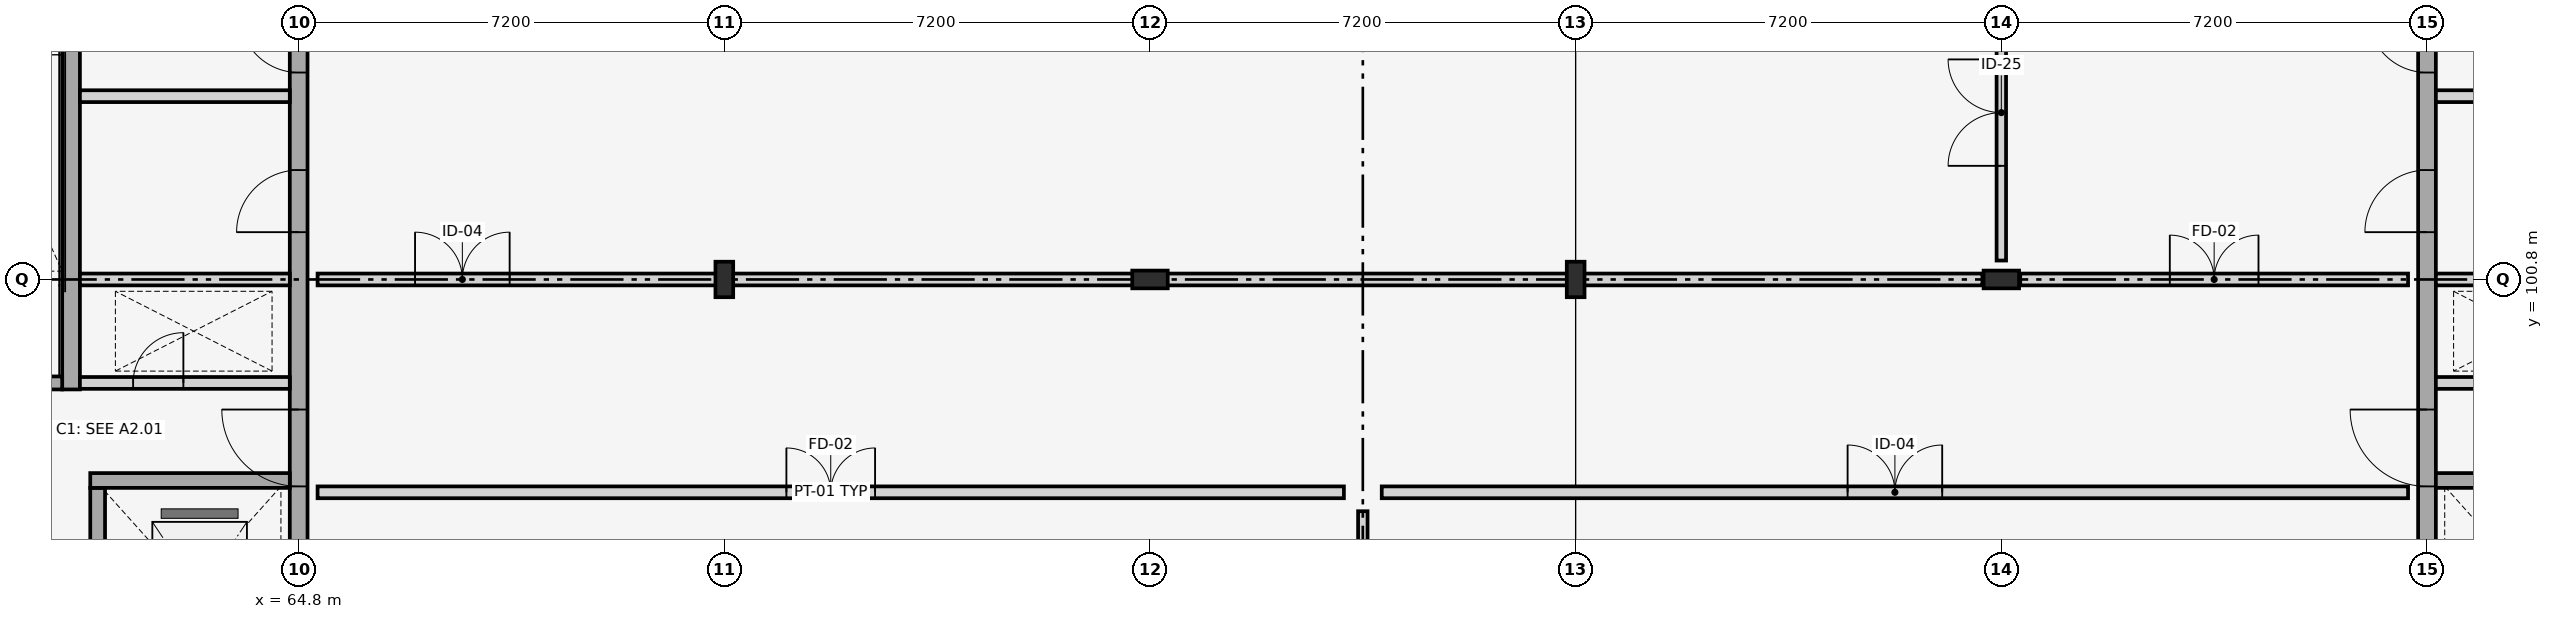
"""IFC4 building model, lengths in metres.
Left out: names, types, materials, properties, quantities, classifications, styles, units other than length and angle.
Written with IfcOpenShell. Run it as: python <this file> out.ifc"""

import sys

from ifc_helpers import new_model, si_unit, direction, frame, frame_2d, origin, origin_2d, place, context, subcontext, project, spatial, rectangle, i_section, extrude, element, fill, save


model = new_model("IFC4")
c1 = context("Model", 3, precision=1e-05, world=origin(), true_north=direction((0.0, 1.0)))
c2 = subcontext(c1, "Body", "Model", "MODEL_VIEW")
j1 = project(units=[si_unit("LENGTHUNIT", "METRE"), si_unit("PLANEANGLEUNIT", "RADIAN")], contexts=[c1])
p1 = place(None, origin())
s1 = spatial("IfcSite", under=j1, at=p1, CompositionType="ELEMENT")
p2 = place(p1, origin())
s2 = spatial("IfcBuilding", under=s1, at=p2, CompositionType="ELEMENT")
p3 = place(p2, origin())
s3 = spatial("IfcBuildingStorey", under=s2, at=p3, CompositionType="ELEMENT", Elevation=0.0)
for number, where, z_axis, x_axis in (
    (1, (72.0, 100.8, 0.0), (0.0, 0.0, 1.0), (1.0, 0.0, 0.0)),
    (2, (79.2, 100.8, 0.0), (0.0, 0.0, 1.0), (0.0, 1.0, 0.0)),
    (3, (86.4, 100.8, 0.0), (0.0, 0.0, 1.0), (1.0, 0.0, 0.0)),
    (4, (93.6, 100.8, 0.0), (0.0, 0.0, 1.0), (0.0, 1.0, 0.0)),
):
    element("IfcColumn", number, at=place(p3, frame(where, z_axis=z_axis, x_axis=x_axis)), inside=s3, PredefinedType="COLUMN", context=c2, shape_type="SweptSolid", body=[
        extrude(i_section(OverallWidth=0.3, OverallDepth=0.6, WebThickness=0.015, FlangeThickness=0.03, FilletRadius=0.027, at=origin_2d()), origin(), (0.0, 0.0, 1.0), 4.5),
    ])
p4 = place(p3, frame((64.8, 93.75, 0.0), z_axis=(0.0, 0.0, 1.0), x_axis=(0.0, 1.0, 0.0)))
e5 = element("IfcWall", 5, at=p4, inside=s3, PredefinedType="SHEAR", context=c2, shape_type="SweptSolid", body=[
    extrude(rectangle(XDim=14.1, YDim=0.3, at=frame_2d((7.05, 0.0))), origin(), (0.0, 0.0, 1.0), 4.28),
])
p5 = place(p4, frame((3.55, 0.0, 0.0)))
e6 = element("IfcOpeningElement", 6, at=p5, cuts=e5, PredefinedType="OPENING", context=c2, shape_type="SweptSolid", body=[
    extrude(rectangle(XDim=1.3, YDim=2.2, at=frame_2d((0.65, 1.1))), frame((0.0, 0.16, 0.0), z_axis=(0.0, -1.0, 0.0), x_axis=(1.0, 0.0, 0.0)), (0.0, 0.0, 1.0), 0.32),
])
p6 = place(p4, frame((7.85, 0.0, 0.0)))
e7 = element("IfcOpeningElement", 7, at=p6, cuts=e5, PredefinedType="OPENING", context=c2, shape_type="SweptSolid", body=[
    extrude(rectangle(XDim=1.05, YDim=2.15, at=frame_2d((0.525, 1.075))), frame((0.0, 0.16, 0.0), z_axis=(0.0, -1.0, 0.0), x_axis=(1.0, 0.0, 0.0)), (0.0, 0.0, 1.0), 0.32),
])
p7 = place(p4, frame((10.55, 0.0, 0.0)))
e8 = element("IfcOpeningElement", 8, at=p7, cuts=e5, PredefinedType="OPENING", context=c2, shape_type="SweptSolid", body=[
    extrude(rectangle(XDim=1.0, YDim=2.15, at=frame_2d((0.5, 1.075))), frame((0.0, 0.16, 0.0), z_axis=(0.0, -1.0, 0.0), x_axis=(1.0, 0.0, 0.0)), (0.0, 0.0, 1.0), 0.32),
])
p8 = place(p3, frame((61.4, 93.75, 0.0), z_axis=(0.0, 0.0, 1.0), x_axis=(0.0, 1.0, 0.0)))
e9 = element("IfcWall", 9, at=p8, inside=s3, PredefinedType="SHEAR", context=c2, shape_type="SweptSolid", body=[
    extrude(rectangle(XDim=3.525, YDim=0.25, at=frame_2d((1.762, 0.0))), origin(), (0.0, 0.0, 1.0), 4.28),
])
p9 = place(p8, frame((1.2, 0.0, 0.0)))
e10 = element("IfcOpeningElement", 10, at=p9, cuts=e9, PredefinedType="OPENING", context=c2, shape_type="SweptSolid", body=[
    extrude(rectangle(XDim=1.1, YDim=2.15, at=frame_2d((0.55, 1.075))), frame((0.0, 0.135, 0.0), z_axis=(0.0, -1.0, 0.0), x_axis=(1.0, 0.0, 0.0)), (0.0, 0.0, 1.0), 0.27),
])
p10 = place(p3, frame((60.95, 98.94, 0.0), z_axis=(0.0, 0.0, 1.0), x_axis=(0.0, 1.0, 0.0)))
e11 = element("IfcWall", 11, at=p10, inside=s3, PredefinedType="SHEAR", context=c2, shape_type="SweptSolid", body=[
    extrude(rectangle(XDim=8.91, YDim=0.3, at=frame_2d((4.455, 0.0))), origin(), (0.0, 0.0, 1.0), 4.28),
])
p11 = place(p3, frame((61.1, 99.05, 0.0), z_axis=(0.0, 0.0, 1.0), x_axis=(1.0, 0.0, 0.0)))
e12 = element("IfcWall", 12, at=p11, inside=s3, PredefinedType="PLUMBINGWALL", context=c2, shape_type="SweptSolid", body=[
    extrude(rectangle(XDim=3.55, YDim=0.2, at=frame_2d((1.775, 0.0))), origin(), (0.0, 0.0, 1.0), 3.7),
])
p12 = place(p11, frame((0.9, 0.0, 0.0)))
e13 = element("IfcOpeningElement", 13, at=p12, cuts=e12, PredefinedType="OPENING", context=c2, shape_type="SweptSolid", body=[
    extrude(rectangle(XDim=0.85, YDim=2.05, at=frame_2d((0.425, 1.025))), frame((0.0, 0.11, 0.0), z_axis=(0.0, -1.0, 0.0), x_axis=(1.0, 0.0, 0.0)), (0.0, 0.0, 1.0), 0.22),
])
p13 = place(p3, frame((57.9, 99.05, 0.0), z_axis=(0.0, 0.0, 1.0), x_axis=(1.0, 0.0, 0.0)))
e14 = element("IfcWall", 14, at=p13, inside=s3, PredefinedType="SHEAR", context=c2, shape_type="SweptSolid", body=[
    extrude(rectangle(XDim=2.9, YDim=0.22, at=frame_2d((1.45, 0.0))), origin(), (0.0, 0.0, 1.0), 4.28),
])
p14 = place(p13, frame((0.75, 0.0, 0.0)))
e15 = element("IfcOpeningElement", 15, at=p14, cuts=e14, PredefinedType="OPENING", context=c2, shape_type="SweptSolid", body=[
    extrude(rectangle(XDim=1.3, YDim=2.2, at=frame_2d((0.65, 1.1))), frame((0.0, 0.12, 0.0), z_axis=(0.0, -1.0, 0.0), x_axis=(1.0, 0.0, 0.0)), (0.0, 0.0, 1.0), 0.24),
])
p15 = place(p3, frame((61.275, 97.4, 0.0), z_axis=(0.0, 0.0, 1.0), x_axis=(1.0, 0.0, 0.0)))
e16 = element("IfcWall", 16, at=p15, inside=s3, PredefinedType="SHEAR", context=c2, shape_type="SweptSolid", body=[
    extrude(rectangle(XDim=3.375, YDim=0.25, at=frame_2d((1.688, 0.0))), origin(), (0.0, 0.0, 1.0), 4.28),
])
for number, where, z_axis, x_axis in (
    (17, (61.1, 100.8, 0.0), (0.0, 0.0, 1.0), (1.0, 0.0, 0.0)),
    (18, (61.1, 103.9, 0.0), (0.0, 0.0, 1.0), (1.0, 0.0, 0.0)),
):
    element("IfcWall", number, at=place(p3, frame(where, z_axis=z_axis, x_axis=x_axis)), inside=s3, PredefinedType="PLUMBINGWALL", context=c2, shape_type="SweptSolid", body=[
        extrude(rectangle(XDim=3.55, YDim=0.2, at=frame_2d((1.775, 0.0))), origin(), (0.0, 0.0, 1.0), 3.7),
    ])
p16 = place(p3, frame((100.8, 93.75, 0.0), z_axis=(0.0, 0.0, 1.0), x_axis=(0.0, 1.0, 0.0)))
e19 = element("IfcWall", 19, at=p16, inside=s3, PredefinedType="SHEAR", context=c2, shape_type="SweptSolid", body=[
    extrude(rectangle(XDim=14.1, YDim=0.3, at=frame_2d((7.05, 0.0))), origin(), (0.0, 0.0, 1.0), 4.28),
])
p17 = place(p16, frame((3.55, 0.0, 0.0)))
e20 = element("IfcOpeningElement", 20, at=p17, cuts=e19, PredefinedType="OPENING", context=c2, shape_type="SweptSolid", body=[
    extrude(rectangle(XDim=1.3, YDim=2.2, at=frame_2d((0.65, 1.1))), frame((0.0, 0.16, 0.0), z_axis=(0.0, -1.0, 0.0), x_axis=(1.0, 0.0, 0.0)), (0.0, 0.0, 1.0), 0.32),
])
p18 = place(p16, frame((7.85, 0.0, 0.0)))
e21 = element("IfcOpeningElement", 21, at=p18, cuts=e19, PredefinedType="OPENING", context=c2, shape_type="SweptSolid", body=[
    extrude(rectangle(XDim=1.05, YDim=2.15, at=frame_2d((0.525, 1.075))), frame((0.0, 0.16, 0.0), z_axis=(0.0, -1.0, 0.0), x_axis=(1.0, 0.0, 0.0)), (0.0, 0.0, 1.0), 0.32),
])
p19 = place(p16, frame((10.55, 0.0, 0.0)))
e22 = element("IfcOpeningElement", 22, at=p19, cuts=e19, PredefinedType="OPENING", context=c2, shape_type="SweptSolid", body=[
    extrude(rectangle(XDim=1.0, YDim=2.15, at=frame_2d((0.5, 1.075))), frame((0.0, 0.16, 0.0), z_axis=(0.0, -1.0, 0.0), x_axis=(1.0, 0.0, 0.0)), (0.0, 0.0, 1.0), 0.32),
])
p20 = place(p3, frame((100.95, 99.05, 0.0), z_axis=(0.0, 0.0, 1.0), x_axis=(1.0, 0.0, 0.0)))
e23 = element("IfcWall", 23, at=p20, inside=s3, PredefinedType="PLUMBINGWALL", context=c2, shape_type="SweptSolid", body=[
    extrude(rectangle(XDim=3.55, YDim=0.2, at=frame_2d((1.775, 0.0))), origin(), (0.0, 0.0, 1.0), 3.7),
])
p21 = place(p20, frame((0.9, 0.0, 0.0)))
e24 = element("IfcOpeningElement", 24, at=p21, cuts=e23, PredefinedType="OPENING", context=c2, shape_type="SweptSolid", body=[
    extrude(rectangle(XDim=0.85, YDim=2.05, at=frame_2d((0.425, 1.025))), frame((0.0, 0.11, 0.0), z_axis=(0.0, -1.0, 0.0), x_axis=(1.0, 0.0, 0.0)), (0.0, 0.0, 1.0), 0.22),
])
p22 = place(p3, frame((100.95, 97.4, 0.0), z_axis=(0.0, 0.0, 1.0), x_axis=(1.0, 0.0, 0.0)))
e25 = element("IfcWall", 25, at=p22, inside=s3, PredefinedType="SHEAR", context=c2, shape_type="SweptSolid", body=[
    extrude(rectangle(XDim=3.375, YDim=0.25, at=frame_2d((1.688, 0.0))), origin(), (0.0, 0.0, 1.0), 4.28),
])
for number, where, z_axis, x_axis in (
    (26, (100.95, 100.8, 0.0), (0.0, 0.0, 1.0), (1.0, 0.0, 0.0)),
    (27, (100.95, 103.9, 0.0), (0.0, 0.0, 1.0), (1.0, 0.0, 0.0)),
):
    element("IfcWall", number, at=place(p3, frame(where, z_axis=z_axis, x_axis=x_axis)), inside=s3, PredefinedType="PLUMBINGWALL", context=c2, shape_type="SweptSolid", body=[
        extrude(rectangle(XDim=3.55, YDim=0.2, at=frame_2d((1.775, 0.0))), origin(), (0.0, 0.0, 1.0), 3.7),
    ])
p23 = place(p3, frame((65.12, 97.2, 0.0), z_axis=(0.0, 0.0, 1.0), x_axis=(1.0, 0.0, 0.0)))
e28 = element("IfcWall", 28, at=p23, inside=s3, PredefinedType="PARTITIONING", context=c2, shape_type="SweptSolid", body=[
    extrude(rectangle(XDim=17.36, YDim=0.2, at=frame_2d((8.68, 0.0))), origin(), (0.0, 0.0, 1.0), 3.45),
])
p24 = place(p23, frame((7.93, 0.0, 0.0)))
e29 = element("IfcOpeningElement", 29, at=p24, cuts=e28, PredefinedType="OPENING", context=c2, shape_type="SweptSolid", body=[
    extrude(rectangle(XDim=1.5, YDim=2.25, at=frame_2d((0.75, 1.125))), frame((0.0, 0.11, 0.0), z_axis=(0.0, -1.0, 0.0), x_axis=(1.0, 0.0, 0.0)), (0.0, 0.0, 1.0), 0.22),
])
p25 = place(p3, frame((83.12, 97.2, 0.0), z_axis=(0.0, 0.0, 1.0), x_axis=(1.0, 0.0, 0.0)))
e30 = element("IfcWall", 30, at=p25, inside=s3, PredefinedType="PARTITIONING", context=c2, shape_type="SweptSolid", body=[
    extrude(rectangle(XDim=17.36, YDim=0.2, at=frame_2d((8.68, 0.0))), origin(), (0.0, 0.0, 1.0), 3.45),
])
p26 = place(p25, frame((7.88, 0.0, 0.0)))
e31 = element("IfcOpeningElement", 31, at=p26, cuts=e30, PredefinedType="OPENING", context=c2, shape_type="SweptSolid", body=[
    extrude(rectangle(XDim=1.6, YDim=2.35, at=frame_2d((0.8, 1.175))), frame((0.0, 0.11, 0.0), z_axis=(0.0, -1.0, 0.0), x_axis=(1.0, 0.0, 0.0)), (0.0, 0.0, 1.0), 0.22),
])
p27 = place(p3, frame((65.12, 100.8, 0.0), z_axis=(0.0, 0.0, 1.0), x_axis=(1.0, 0.0, 0.0)))
e32 = element("IfcWall", 32, at=p27, inside=s3, PredefinedType="PARTITIONING", context=c2, shape_type="SweptSolid", body=[
    extrude(rectangle(XDim=28.16, YDim=0.2, at=frame_2d((14.08, 0.0))), origin(), (0.0, 0.0, 1.0), 3.45),
])
p28 = place(p27, frame((1.649, 0.0, 0.0)))
e33 = element("IfcOpeningElement", 33, at=p28, cuts=e32, PredefinedType="OPENING", context=c2, shape_type="SweptSolid", body=[
    extrude(rectangle(XDim=1.6, YDim=2.35, at=frame_2d((0.8, 1.175))), frame((0.0, 0.11, 0.0), z_axis=(0.0, -1.0, 0.0), x_axis=(1.0, 0.0, 0.0)), (0.0, 0.0, 1.0), 0.22),
])
p29 = place(p3, frame((93.92, 100.8, 0.0), z_axis=(0.0, 0.0, 1.0), x_axis=(1.0, 0.0, 0.0)))
e34 = element("IfcWall", 34, at=p29, inside=s3, PredefinedType="PARTITIONING", context=c2, shape_type="SweptSolid", body=[
    extrude(rectangle(XDim=6.56, YDim=0.2, at=frame_2d((3.28, 0.0))), origin(), (0.0, 0.0, 1.0), 3.45),
])
p30 = place(p29, frame((2.53, 0.0, 0.0)))
e35 = element("IfcOpeningElement", 35, at=p30, cuts=e34, PredefinedType="OPENING", context=c2, shape_type="SweptSolid", body=[
    extrude(rectangle(XDim=1.5, YDim=2.25, at=frame_2d((0.75, 1.125))), frame((0.0, 0.11, 0.0), z_axis=(0.0, -1.0, 0.0), x_axis=(1.0, 0.0, 0.0)), (0.0, 0.0, 1.0), 0.22),
])
p31 = place(p3, frame((82.8, 86.72, 0.0), z_axis=(0.0, 0.0, 1.0), x_axis=(0.0, 1.0, 0.0)))
e36 = element("IfcWall", 36, at=p31, inside=s3, PredefinedType="PARTITIONING", context=c2, shape_type="SweptSolid", body=[
    extrude(rectangle(XDim=10.16, YDim=0.16, at=frame_2d((5.08, 0.0))), origin(), (0.0, 0.0, 1.0), 3.45),
])
p32 = place(p31, frame((4.355, 0.0, 0.0)))
e37 = element("IfcOpeningElement", 37, at=p32, cuts=e36, PredefinedType="OPENING", context=c2, shape_type="SweptSolid", body=[
    extrude(rectangle(XDim=1.45, YDim=2.35, at=frame_2d((0.725, 1.175))), frame((0.0, 0.09, 0.0), z_axis=(0.0, -1.0, 0.0), x_axis=(1.0, 0.0, 0.0)), (0.0, 0.0, 1.0), 0.18),
])
p33 = place(p3, frame((93.6, 101.12, 0.0), z_axis=(0.0, 0.0, 1.0), x_axis=(0.0, 1.0, 0.0)))
e38 = element("IfcWall", 38, at=p33, inside=s3, PredefinedType="PARTITIONING", context=c2, shape_type="SweptSolid", body=[
    extrude(rectangle(XDim=13.76, YDim=0.16, at=frame_2d((6.88, 0.0))), origin(), (0.0, 0.0, 1.0), 3.45),
])
p34 = place(p33, frame((1.602, 0.0, 0.0)))
e39 = element("IfcOpeningElement", 39, at=p34, cuts=e38, PredefinedType="OPENING", context=c2, shape_type="SweptSolid", body=[
    extrude(rectangle(XDim=1.8, YDim=2.55, at=frame_2d((0.9, 1.275))), frame((0.0, 0.09, 0.0), z_axis=(0.0, -1.0, 0.0), x_axis=(1.0, 0.0, 0.0)), (0.0, 0.0, 1.0), 0.18),
])
p35 = place(p5, origin())
e40 = element("IfcDoor", 40, at=p35, inside=s3, OperationType="SINGLE_SWING_RIGHT", PredefinedType="DOOR", context=c2, shape_type="SweptSolid", body=[
    extrude(rectangle(XDim=1.3, YDim=2.2, at=frame_2d((0.65, 1.1))), frame((0.0, 0.025, 0.0), z_axis=(0.0, -1.0, 0.0), x_axis=(1.0, 0.0, 0.0)), (0.0, 0.0, 1.0), 0.05),
])
fill(e6, e40)
p36 = place(p6, origin())
e41 = element("IfcDoor", 41, at=p36, inside=s3, OperationType="SINGLE_SWING_LEFT", PredefinedType="DOOR", context=c2, shape_type="SweptSolid", body=[
    extrude(rectangle(XDim=1.05, YDim=2.15, at=frame_2d((0.525, 1.075))), frame((0.0, 0.025, 0.0), z_axis=(0.0, -1.0, 0.0), x_axis=(1.0, 0.0, 0.0)), (0.0, 0.0, 1.0), 0.05),
])
fill(e7, e41)
p37 = place(p7, origin())
e42 = element("IfcDoor", 42, at=p37, inside=s3, OperationType="SINGLE_SWING_RIGHT", PredefinedType="DOOR", context=c2, shape_type="SweptSolid", body=[
    extrude(rectangle(XDim=1.0, YDim=2.15, at=frame_2d((0.5, 1.075))), frame((0.0, 0.025, 0.0), z_axis=(0.0, -1.0, 0.0), x_axis=(1.0, 0.0, 0.0)), (0.0, 0.0, 1.0), 0.05),
])
fill(e8, e42)
p38 = place(p12, origin())
e43 = element("IfcDoor", 43, at=p38, inside=s3, OperationType="SINGLE_SWING_RIGHT", PredefinedType="TRAPDOOR", context=c2, shape_type="SweptSolid", body=[
    extrude(rectangle(XDim=0.85, YDim=2.05, at=frame_2d((0.425, 1.025))), frame((0.0, 0.025, 0.0), z_axis=(0.0, -1.0, 0.0), x_axis=(1.0, 0.0, 0.0)), (0.0, 0.0, 1.0), 0.05),
])
fill(e13, e43)
p39 = place(p17, origin())
e44 = element("IfcDoor", 44, at=p39, inside=s3, OperationType="SINGLE_SWING_RIGHT", PredefinedType="DOOR", context=c2, shape_type="SweptSolid", body=[
    extrude(rectangle(XDim=1.3, YDim=2.2, at=frame_2d((0.65, 1.1))), frame((0.0, 0.025, 0.0), z_axis=(0.0, -1.0, 0.0), x_axis=(1.0, 0.0, 0.0)), (0.0, 0.0, 1.0), 0.05),
])
fill(e20, e44)
p40 = place(p18, origin())
e45 = element("IfcDoor", 45, at=p40, inside=s3, OperationType="SINGLE_SWING_LEFT", PredefinedType="DOOR", context=c2, shape_type="SweptSolid", body=[
    extrude(rectangle(XDim=1.05, YDim=2.15, at=frame_2d((0.525, 1.075))), frame((0.0, 0.025, 0.0), z_axis=(0.0, -1.0, 0.0), x_axis=(1.0, 0.0, 0.0)), (0.0, 0.0, 1.0), 0.05),
])
fill(e21, e45)
p41 = place(p19, origin())
e46 = element("IfcDoor", 46, at=p41, inside=s3, OperationType="SINGLE_SWING_RIGHT", PredefinedType="DOOR", context=c2, shape_type="SweptSolid", body=[
    extrude(rectangle(XDim=1.0, YDim=2.15, at=frame_2d((0.5, 1.075))), frame((0.0, 0.025, 0.0), z_axis=(0.0, -1.0, 0.0), x_axis=(1.0, 0.0, 0.0)), (0.0, 0.0, 1.0), 0.05),
])
fill(e22, e46)
p42 = place(p24, origin())
e47 = element("IfcDoor", 47, at=p42, inside=s3, OperationType="DOUBLE_DOOR_SINGLE_SWING", PredefinedType="DOOR", context=c2, shape_type="SweptSolid", body=[
    extrude(rectangle(XDim=1.5, YDim=2.25, at=frame_2d((0.75, 1.125))), frame((0.0, 0.025, 0.0), z_axis=(0.0, -1.0, 0.0), x_axis=(1.0, 0.0, 0.0)), (0.0, 0.0, 1.0), 0.05),
])
fill(e29, e47)
p43 = place(p26, origin())
e48 = element("IfcDoor", 48, at=p43, inside=s3, OperationType="DOUBLE_DOOR_SINGLE_SWING", PredefinedType="DOOR", context=c2, shape_type="SweptSolid", body=[
    extrude(rectangle(XDim=1.6, YDim=2.35, at=frame_2d((0.8, 1.175))), frame((0.0, 0.025, 0.0), z_axis=(0.0, -1.0, 0.0), x_axis=(1.0, 0.0, 0.0)), (0.0, 0.0, 1.0), 0.05),
])
fill(e31, e48)
p44 = place(p28, origin())
e49 = element("IfcDoor", 49, at=p44, inside=s3, OperationType="DOUBLE_DOOR_SINGLE_SWING", PredefinedType="DOOR", context=c2, shape_type="SweptSolid", body=[
    extrude(rectangle(XDim=1.6, YDim=2.35, at=frame_2d((0.8, 1.175))), frame((0.0, 0.025, 0.0), z_axis=(0.0, -1.0, 0.0), x_axis=(1.0, 0.0, 0.0)), (0.0, 0.0, 1.0), 0.05),
])
fill(e33, e49)
p45 = place(p30, origin())
e50 = element("IfcDoor", 50, at=p45, inside=s3, OperationType="DOUBLE_DOOR_SINGLE_SWING", PredefinedType="DOOR", context=c2, shape_type="SweptSolid", body=[
    extrude(rectangle(XDim=1.5, YDim=2.25, at=frame_2d((0.75, 1.125))), frame((0.0, 0.025, 0.0), z_axis=(0.0, -1.0, 0.0), x_axis=(1.0, 0.0, 0.0)), (0.0, 0.0, 1.0), 0.05),
])
fill(e35, e50)
p46 = place(p34, origin())
e51 = element("IfcDoor", 51, at=p46, inside=s3, OperationType="DOUBLE_DOOR_SINGLE_SWING", PredefinedType="DOOR", context=c2, shape_type="SweptSolid", body=[
    extrude(rectangle(XDim=1.8, YDim=2.55, at=frame_2d((0.9, 1.275))), frame((0.0, 0.025, 0.0), z_axis=(0.0, -1.0, 0.0), x_axis=(1.0, 0.0, 0.0)), (0.0, 0.0, 1.0), 0.05),
])
fill(e39, e51)
save(model, sys.argv[1])
